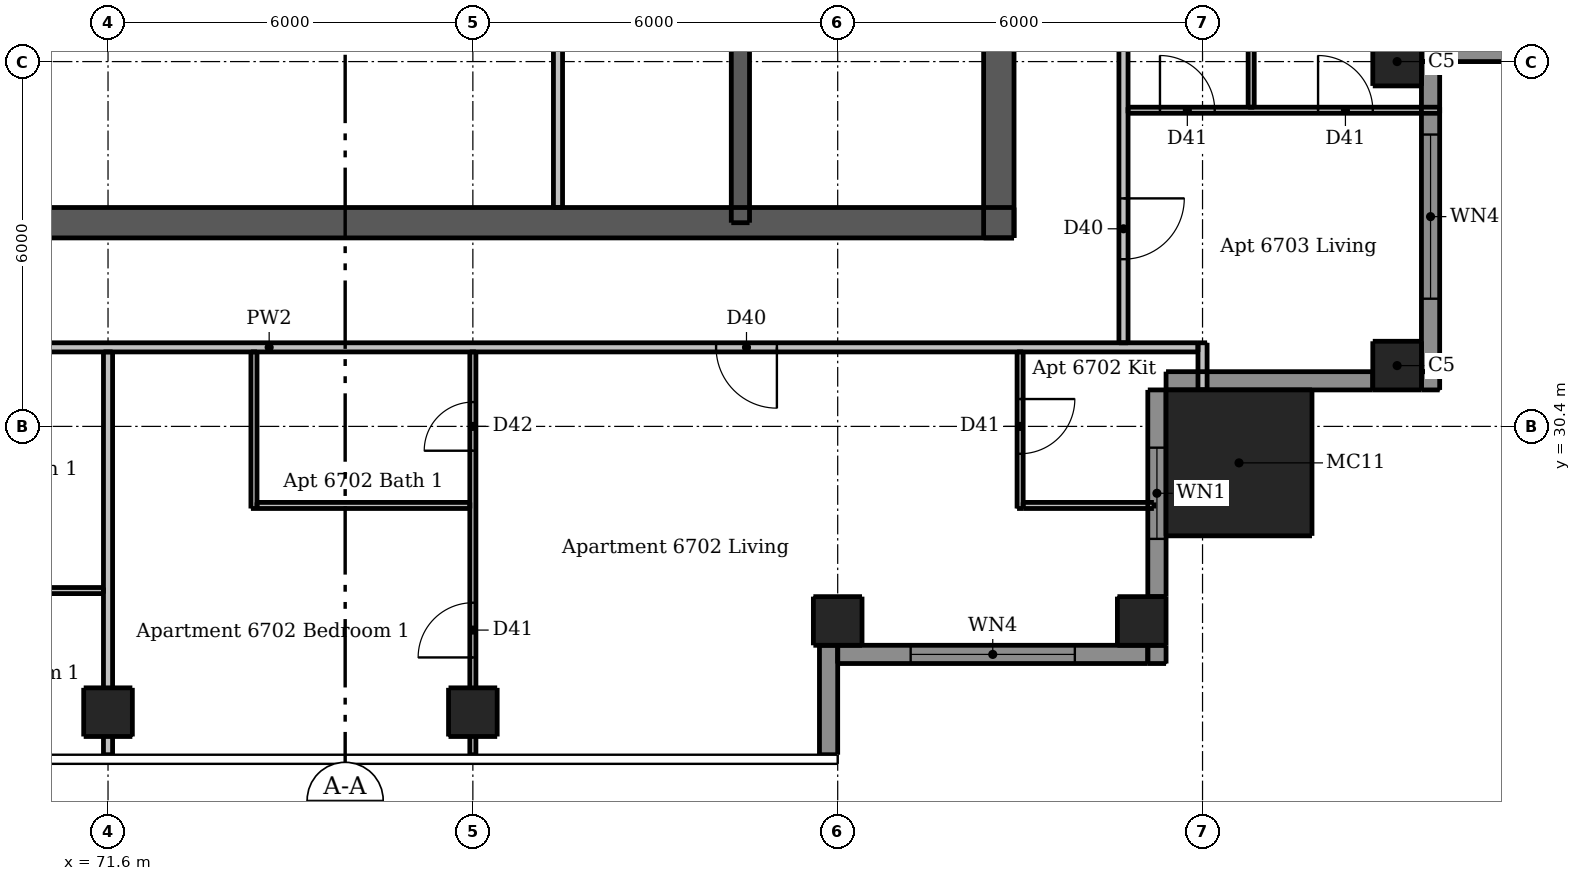
"""IFC4 building model, lengths in metres.
Left out: names, types, materials, properties, quantities, classifications, styles, units other than length and angle.
Written with IfcOpenShell. Run it as: python <this file> out.ifc"""

import sys

from ifc_helpers import new_model, si_unit, direction, frame, frame_2d, origin, origin_2d, place, context, subcontext, project, spatial, rectangle, extrude, element, fill, save


model = new_model("IFC4")
c1 = context("Model", 3, precision=1e-05, world=origin(), true_north=direction((0.0, 1.0)))
c2 = subcontext(c1, "Body", "Model", "MODEL_VIEW")
j1 = project(units=[si_unit("LENGTHUNIT", "METRE"), si_unit("PLANEANGLEUNIT", "RADIAN")], contexts=[c1])
p1 = place(None, origin())
s1 = spatial("IfcSite", under=j1, at=p1, CompositionType="ELEMENT")
p2 = place(p1, origin())
s2 = spatial("IfcBuilding", under=s1, at=p2, CompositionType="ELEMENT")
p3 = place(p2, frame((0.0, 0.0, 252.1)))
s3 = spatial("IfcBuildingStorey", under=s2, at=p3, CompositionType="ELEMENT", Elevation=252.1)
p4 = place(p3, frame((62.5, 33.75, 0.0), z_axis=(0.0, 0.0, 1.0), x_axis=(1.0, 0.0, 0.0)))
e1 = element("IfcWall", 1, at=p4, inside=s3, PredefinedType="SHEAR", context=c2, shape_type="SweptSolid", body=[
    extrude(rectangle(XDim=24.0, YDim=0.5, at=frame_2d((12.0, 0.0))), origin(), (0.0, 0.0, 1.0), 3.05),
])
p5 = place(p4, frame((1.875, 0.0, 0.0)))
e2 = element("IfcOpeningElement", 2, at=p5, cuts=e1, PredefinedType="OPENING", context=c2, shape_type="SweptSolid", body=[
    extrude(rectangle(XDim=1.1, YDim=2.1, at=frame_2d((0.55, 1.05))), frame((0.0, 0.26, 0.0), z_axis=(0.0, -1.0, 0.0), x_axis=(1.0, 0.0, 0.0)), (0.0, 0.0, 1.0), 0.52),
])
p6 = place(p4, frame((21.025, 0.0, 0.0)))
e3 = element("IfcOpeningElement", 3, at=p6, cuts=e1, PredefinedType="OPENING", context=c2, shape_type="SweptSolid", body=[
    extrude(rectangle(XDim=1.1, YDim=2.1, at=frame_2d((0.55, 1.05))), frame((0.0, 0.26, 0.0), z_axis=(0.0, -1.0, 0.0), x_axis=(1.0, 0.0, 0.0)), (0.0, 0.0, 1.0), 0.52),
])
p7 = place(p4, frame((8.0, 0.0, 0.0)))
e4 = element("IfcOpeningElement", 4, at=p7, cuts=e1, PredefinedType="OPENING", context=c2, shape_type="SweptSolid", body=[
    extrude(rectangle(XDim=1.1, YDim=2.1, at=frame_2d((0.55, 1.05))), frame((0.0, 0.26, 0.0), z_axis=(0.0, -1.0, 0.0), x_axis=(1.0, 0.0, 0.0)), (0.0, 0.0, 1.0), 0.52),
])
p8 = place(p4, frame((17.512, 0.0, 0.0)))
e5 = element("IfcOpeningElement", 5, at=p8, cuts=e1, PredefinedType="OPENING", context=c2, shape_type="SweptSolid", body=[
    extrude(rectangle(XDim=0.9, YDim=2.1, at=frame_2d((0.45, 1.05))), frame((0.0, 0.26, 0.0), z_axis=(0.0, -1.0, 0.0), x_axis=(1.0, 0.0, 0.0)), (0.0, 0.0, 1.0), 0.52),
])
p9 = place(p3, frame((86.25, 33.5, 0.0), z_axis=(0.0, 0.0, 1.0), x_axis=(0.0, 1.0, 0.0)))
e6 = element("IfcWall", 6, at=p9, inside=s3, PredefinedType="SHEAR", context=c2, shape_type="SweptSolid", body=[
    extrude(rectangle(XDim=24.0, YDim=0.5, at=frame_2d((12.0, 0.0))), origin(), (0.0, 0.0, 1.0), 3.05),
])
p10 = place(p9, frame((11.2, 0.0, 0.0)))
e7 = element("IfcOpeningElement", 7, at=p10, cuts=e6, PredefinedType="OPENING", context=c2, shape_type="SweptSolid", body=[
    extrude(rectangle(XDim=1.6, YDim=2.1, at=frame_2d((0.8, 1.05))), frame((0.0, 0.26, 0.0), z_axis=(0.0, -1.0, 0.0), x_axis=(1.0, 0.0, 0.0)), (0.0, 0.0, 1.0), 0.52),
])
p11 = place(p3, frame((82.0, 33.75, 0.0), z_axis=(0.0, 0.0, 1.0), x_axis=(0.0, 1.0, 0.0)))
e8 = element("IfcWall", 8, at=p11, inside=s3, PredefinedType="SHEAR", context=c2, shape_type="SweptSolid", body=[
    extrude(rectangle(XDim=10.15, YDim=0.3, at=frame_2d((5.075, 0.0))), origin(), (0.0, 0.0, 1.0), 3.05),
])
for number, where, z_axis, x_axis in (
    (9, (71.6, 25.7, 0.0), (0.0, 0.0, 1.0), (1.0, 0.0, 0.0)),
    (10, (77.6, 25.7, 0.0), (0.0, 0.0, 1.0), (1.0, 0.0, 0.0)),
    (11, (83.6, 27.2, 0.0), (0.0, 0.0, 1.0), (1.0, 0.0, 0.0)),
    (12, (88.6, 27.2, 0.0), (0.0, 0.0, 1.0), (1.0, 0.0, 0.0)),
    (13, (92.8, 31.4, 0.0), (0.0, 0.0, 1.0), (1.0, 0.0, 0.0)),
    (14, (92.8, 36.4, 0.0), (0.0, 0.0, 1.0), (1.0, 0.0, 0.0)),
):
    element("IfcColumn", number, at=place(p3, frame(where, z_axis=z_axis, x_axis=x_axis)), inside=s3, PredefinedType="COLUMN", context=c2, shape_type="SweptSolid", body=[
        extrude(rectangle(XDim=0.8, YDim=0.8, at=origin_2d()), origin(), (0.0, 0.0, 1.0), 3.05),
    ])
p12 = place(p3, frame((90.2, 29.8, 0.0), z_axis=(0.0, 0.0, 1.0), x_axis=(1.0, 0.0, 0.0)))
e15 = element("IfcColumn", 15, at=p12, inside=s3, PredefinedType="COLUMN", context=c2, shape_type="SweptSolid", body=[
    extrude(rectangle(XDim=2.4, YDim=2.4, at=origin_2d()), origin(), (0.0, 0.0, 1.0), 3.3),
])
p13 = place(p3, frame((83.45, 25.0, 0.0), z_axis=(0.0, 0.0, 1.0), x_axis=(0.0, 1.0, 0.0)))
e16 = element("IfcWall", 16, at=p13, inside=s3, PredefinedType="SOLIDWALL", context=c2, shape_type="SweptSolid", body=[
    extrude(rectangle(XDim=1.8, YDim=0.3, at=frame_2d((0.9, 0.0))), origin(), (0.0, 0.0, 1.0), 3.05),
])
p14 = place(p3, frame((88.85, 26.5, 0.0), z_axis=(0.0, 0.0, 1.0), x_axis=(0.0, 1.0, 0.0)))
e17 = element("IfcWall", 17, at=p14, inside=s3, PredefinedType="SOLIDWALL", context=c2, shape_type="SweptSolid", body=[
    extrude(rectangle(XDim=0.3, YDim=0.3, at=frame_2d((0.15, 0.0))), origin(), (0.0, 0.0, 1.0), 3.05),
])
p15 = place(p3, frame((88.85, 27.6, 0.0), z_axis=(0.0, 0.0, 1.0), x_axis=(0.0, 1.0, 0.0)))
e18 = element("IfcWall", 18, at=p15, inside=s3, PredefinedType="SOLIDWALL", context=c2, shape_type="SweptSolid", body=[
    extrude(rectangle(XDim=3.4, YDim=0.3, at=frame_2d((1.7, 0.0))), origin(), (0.0, 0.0, 1.0), 3.05),
])
p16 = place(p15, frame((0.95, 0.0, 0.9)))
e19 = element("IfcOpeningElement", 19, at=p16, cuts=e18, PredefinedType="OPENING", context=c2, shape_type="SweptSolid", body=[
    extrude(rectangle(XDim=1.5, YDim=1.5, at=frame_2d((0.75, 0.75))), frame((0.0, 0.16, 0.0), z_axis=(0.0, -1.0, 0.0), x_axis=(1.0, 0.0, 0.0)), (0.0, 0.0, 1.0), 0.32),
])
p17 = place(p3, frame((89.0, 31.15, 0.0), z_axis=(0.0, 0.0, 1.0), x_axis=(1.0, 0.0, 0.0)))
e20 = element("IfcWall", 20, at=p17, inside=s3, PredefinedType="SOLIDWALL", context=c2, shape_type="SweptSolid", body=[
    extrude(rectangle(XDim=3.4, YDim=0.3, at=frame_2d((1.7, 0.0))), origin(), (0.0, 0.0, 1.0), 3.05),
])
p18 = place(p3, frame((93.2, 31.15, 0.0), z_axis=(0.0, 0.0, 1.0), x_axis=(1.0, 0.0, 0.0)))
e21 = element("IfcWall", 21, at=p18, inside=s3, PredefinedType="SOLIDWALL", context=c2, shape_type="SweptSolid", body=[
    extrude(rectangle(XDim=0.3, YDim=0.3, at=frame_2d((0.15, 0.0))), origin(), (0.0, 0.0, 1.0), 3.05),
])
p19 = place(p3, frame((93.2, 36.55, 0.0), z_axis=(0.0, 0.0, 1.0), x_axis=(1.0, 0.0, 0.0)))
e22 = element("IfcWall", 22, at=p19, inside=s3, PredefinedType="SOLIDWALL", context=c2, shape_type="SweptSolid", body=[
    extrude(rectangle(XDim=1.8, YDim=0.3, at=frame_2d((0.9, 0.0))), origin(), (0.0, 0.0, 1.0), 3.05),
])
p20 = place(p3, frame((83.6, 26.65, 0.0), z_axis=(0.0, 0.0, 1.0), x_axis=(1.0, 0.0, 0.0)))
e23 = element("IfcWall", 23, at=p20, inside=s3, PredefinedType="SOLIDWALL", context=c2, shape_type="SweptSolid", body=[
    extrude(rectangle(XDim=5.1, YDim=0.3, at=frame_2d((2.55, 0.0))), origin(), (0.0, 0.0, 1.0), 3.05),
])
p21 = place(p20, frame((1.2, 0.0, 0.15)))
e24 = element("IfcOpeningElement", 24, at=p21, cuts=e23, PredefinedType="OPENING", context=c2, shape_type="SweptSolid", body=[
    extrude(rectangle(XDim=2.7, YDim=2.1, at=frame_2d((1.35, 1.05))), frame((0.0, 0.16, 0.0), z_axis=(0.0, -1.0, 0.0), x_axis=(1.0, 0.0, 0.0)), (0.0, 0.0, 1.0), 0.32),
])
p22 = place(p3, frame((93.35, 31.3, 0.0), z_axis=(0.0, 0.0, 1.0), x_axis=(0.0, 1.0, 0.0)))
e25 = element("IfcWall", 25, at=p22, inside=s3, PredefinedType="SOLIDWALL", context=c2, shape_type="SweptSolid", body=[
    extrude(rectangle(XDim=5.1, YDim=0.3, at=frame_2d((2.55, 0.0))), origin(), (0.0, 0.0, 1.0), 3.05),
])
p23 = place(p22, frame((1.2, 0.0, 0.15)))
e26 = element("IfcOpeningElement", 26, at=p23, cuts=e25, PredefinedType="OPENING", context=c2, shape_type="SweptSolid", body=[
    extrude(rectangle(XDim=2.7, YDim=2.1, at=frame_2d((1.35, 1.05))), frame((0.0, 0.16, 0.0), z_axis=(0.0, -1.0, 0.0), x_axis=(1.0, 0.0, 0.0)), (0.0, 0.0, 1.0), 0.32),
])
p24 = place(p3, frame((79.0, 34.0, 0.0), z_axis=(0.0, 0.0, 1.0), x_axis=(0.0, 1.0, 0.0)))
e27 = element("IfcWall", 27, at=p24, inside=s3, PredefinedType="PLUMBINGWALL", context=c2, shape_type="SweptSolid", body=[
    extrude(rectangle(XDim=6.85, YDim=0.15, at=frame_2d((3.425, 0.0))), origin(), (0.0, 0.0, 1.0), 3.05),
])
p25 = place(p3, frame((74.0, 29.05, 0.0), z_axis=(0.0, 0.0, 1.0), x_axis=(0.0, 1.0, 0.0)))
e28 = element("IfcWall", 28, at=p25, inside=s3, PredefinedType="PARTITIONING", context=c2, shape_type="SweptSolid", body=[
    extrude(rectangle(XDim=2.575, YDim=0.1, at=frame_2d((1.288, 0.0))), origin(), (0.0, 0.0, 1.0), 3.05),
])
p26 = place(p3, frame((77.6, 25.0, 0.0), z_axis=(0.0, 0.0, 1.0), x_axis=(0.0, 1.0, 0.0)))
e29 = element("IfcWall", 29, at=p26, inside=s3, PredefinedType="PARTITIONING", context=c2, shape_type="SweptSolid", body=[
    extrude(rectangle(XDim=6.625, YDim=0.1, at=frame_2d((3.312, 0.0))), origin(), (0.0, 0.0, 1.0), 2.59),
])
p27 = place(p26, frame((1.6, 0.0, 0.0)))
e30 = element("IfcOpeningElement", 30, at=p27, cuts=e29, PredefinedType="OPENING", context=c2, shape_type="SweptSolid", body=[
    extrude(rectangle(XDim=0.9, YDim=2.1, at=frame_2d((0.45, 1.05))), frame((0.0, 0.06, 0.0), z_axis=(0.0, -1.0, 0.0), x_axis=(1.0, 0.0, 0.0)), (0.0, 0.0, 1.0), 0.12),
])
p28 = place(p26, frame((5.0, 0.0, 0.0)))
e31 = element("IfcOpeningElement", 31, at=p28, cuts=e29, PredefinedType="OPENING", context=c2, shape_type="SweptSolid", body=[
    extrude(rectangle(XDim=0.8, YDim=2.1, at=frame_2d((0.4, 1.05))), frame((0.0, 0.06, 0.0), z_axis=(0.0, -1.0, 0.0), x_axis=(1.0, 0.0, 0.0)), (0.0, 0.0, 1.0), 0.12),
])
p29 = place(p3, frame((86.6, 31.625, 0.0), z_axis=(0.0, 0.0, 1.0), x_axis=(0.0, -1.0, 0.0)))
e32 = element("IfcWall", 32, at=p29, inside=s3, PredefinedType="PARTITIONING", context=c2, shape_type="SweptSolid", body=[
    extrude(rectangle(XDim=2.575, YDim=0.1, at=frame_2d((1.288, 0.0))), origin(), (0.0, 0.0, 1.0), 3.05),
])
p30 = place(p29, frame((0.775, 0.0, 0.0)))
e33 = element("IfcOpeningElement", 33, at=p30, cuts=e32, PredefinedType="OPENING", context=c2, shape_type="SweptSolid", body=[
    extrude(rectangle(XDim=0.9, YDim=2.1, at=frame_2d((0.45, 1.05))), frame((0.0, 0.06, 0.0), z_axis=(0.0, -1.0, 0.0), x_axis=(1.0, 0.0, 0.0)), (0.0, 0.0, 1.0), 0.12),
])
p31 = place(p3, frame((90.4, 35.65, 0.0), z_axis=(0.0, 0.0, 1.0), x_axis=(0.0, 1.0, 0.0)))
e34 = element("IfcWall", 34, at=p31, inside=s3, PredefinedType="PARTITIONING", context=c2, shape_type="SweptSolid", body=[
    extrude(rectangle(XDim=6.675, YDim=0.1, at=frame_2d((3.337, 0.0))), origin(), (0.0, 0.0, 1.0), 3.05),
])
p32 = place(p31, frame((4.15, 0.0, 0.0)))
e35 = element("IfcOpeningElement", 35, at=p32, cuts=e34, PredefinedType="OPENING", context=c2, shape_type="SweptSolid", body=[
    extrude(rectangle(XDim=0.8, YDim=2.1, at=frame_2d((0.4, 1.05))), frame((0.0, 0.06, 0.0), z_axis=(0.0, -1.0, 0.0), x_axis=(1.0, 0.0, 0.0)), (0.0, 0.0, 1.0), 0.12),
])
p33 = place(p3, frame((88.375, 35.6, 0.0), z_axis=(0.0, 0.0, 1.0), x_axis=(1.0, 0.0, 0.0)))
e36 = element("IfcWall", 36, at=p33, inside=s3, PredefinedType="PARTITIONING", context=c2, shape_type="SweptSolid", body=[
    extrude(rectangle(XDim=5.125, YDim=0.1, at=frame_2d((2.562, 0.0))), origin(), (0.0, 0.0, 1.0), 3.05),
])
p34 = place(p33, frame((0.525, 0.0, 0.0)))
e37 = element("IfcOpeningElement", 37, at=p34, cuts=e36, PredefinedType="OPENING", context=c2, shape_type="SweptSolid", body=[
    extrude(rectangle(XDim=0.9, YDim=2.1, at=frame_2d((0.45, 1.05))), frame((0.0, 0.06, 0.0), z_axis=(0.0, -1.0, 0.0), x_axis=(1.0, 0.0, 0.0)), (0.0, 0.0, 1.0), 0.12),
])
p35 = place(p33, frame((3.125, 0.0, 0.0)))
e38 = element("IfcOpeningElement", 38, at=p35, cuts=e36, PredefinedType="OPENING", context=c2, shape_type="SweptSolid", body=[
    extrude(rectangle(XDim=0.9, YDim=2.1, at=frame_2d((0.45, 1.05))), frame((0.0, 0.06, 0.0), z_axis=(0.0, -1.0, 0.0), x_axis=(1.0, 0.0, 0.0)), (0.0, 0.0, 1.0), 0.12),
])
p36 = place(p3, frame((74.05, 29.1, 0.0), z_axis=(0.0, 0.0, 1.0), x_axis=(1.0, 0.0, 0.0)))
e39 = element("IfcWall", 39, at=p36, inside=s3, PredefinedType="PARTITIONING", context=c2, shape_type="SweptSolid", body=[
    extrude(rectangle(XDim=3.5, YDim=0.1, at=frame_2d((1.75, 0.0))), origin(), (0.0, 0.0, 1.0), 3.05),
])
p37 = place(p3, frame((86.65, 29.1, 0.0), z_axis=(0.0, 0.0, 1.0), x_axis=(1.0, 0.0, 0.0)))
e40 = element("IfcWall", 40, at=p37, inside=s3, PredefinedType="PARTITIONING", context=c2, shape_type="SweptSolid", body=[
    extrude(rectangle(XDim=2.15, YDim=0.1, at=frame_2d((1.075, 0.0))), origin(), (0.0, 0.0, 1.0), 3.05),
])
p38 = place(p3, frame((65.65, 27.7, 0.0), z_axis=(0.0, 0.0, 1.0), x_axis=(1.0, 0.0, 0.0)))
e41 = element("IfcWall", 41, at=p38, inside=s3, PredefinedType="PARTITIONING", context=c2, shape_type="SweptSolid", body=[
    extrude(rectangle(XDim=5.875, YDim=0.1, at=frame_2d((2.938, 0.0))), origin(), (0.0, 0.0, 1.0), 3.05),
])
p39 = place(p38, frame((3.75, 0.0, 0.0)))
e42 = element("IfcOpeningElement", 42, at=p39, cuts=e41, PredefinedType="OPENING", context=c2, shape_type="SweptSolid", body=[
    extrude(rectangle(XDim=0.8, YDim=2.1, at=frame_2d((0.4, 1.05))), frame((0.0, 0.06, 0.0), z_axis=(0.0, -1.0, 0.0), x_axis=(1.0, 0.0, 0.0)), (0.0, 0.0, 1.0), 0.12),
])
p40 = place(p3, frame((71.6, 25.0, 0.0), z_axis=(0.0, 0.0, 1.0), x_axis=(0.0, 1.0, 0.0)))
e43 = element("IfcWall", 43, at=p40, inside=s3, PredefinedType="PARTITIONING", context=c2, shape_type="SweptSolid", body=[
    extrude(rectangle(XDim=6.625, YDim=0.15, at=frame_2d((3.312, 0.0))), origin(), (0.0, 0.0, 1.0), 2.59),
])
p41 = place(p3, frame((88.3, 61.175, 0.0), z_axis=(0.0, 0.0, 1.0), x_axis=(0.0, -1.0, 0.0)))
e44 = element("IfcWall", 44, at=p41, inside=s3, PredefinedType="PARTITIONING", context=c2, shape_type="SweptSolid", body=[
    extrude(rectangle(XDim=29.4, YDim=0.15, at=frame_2d((14.7, 0.0))), origin(), (0.0, 0.0, 1.0), 3.05),
])
p42 = place(p41, frame((27.025, 0.0, 0.0)))
e45 = element("IfcOpeningElement", 45, at=p42, cuts=e44, PredefinedType="OPENING", context=c2, shape_type="SweptSolid", body=[
    extrude(rectangle(XDim=1.0, YDim=2.1, at=frame_2d((0.5, 1.05))), frame((0.0, 0.085, 0.0), z_axis=(0.0, -1.0, 0.0), x_axis=(1.0, 0.0, 0.0)), (0.0, 0.0, 1.0), 0.17),
])
p43 = place(p41, frame((9.275, 0.0, 0.0)))
e46 = element("IfcOpeningElement", 46, at=p43, cuts=e44, PredefinedType="OPENING", context=c2, shape_type="SweptSolid", body=[
    extrude(rectangle(XDim=1.0, YDim=2.1, at=frame_2d((0.5, 1.05))), frame((0.0, 0.085, 0.0), z_axis=(0.0, -1.0, 0.0), x_axis=(1.0, 0.0, 0.0)), (0.0, 0.0, 1.0), 0.17),
])
p44 = place(p3, frame((89.6, 31.0, 0.0), z_axis=(0.0, 0.0, 1.0), x_axis=(0.0, 1.0, 0.0)))
e47 = element("IfcWall", 47, at=p44, inside=s3, PredefinedType="PARTITIONING", context=c2, shape_type="SweptSolid", body=[
    extrude(rectangle(XDim=0.775, YDim=0.15, at=frame_2d((0.387, 0.0))), origin(), (0.0, 0.0, 1.0), 3.05),
])
p45 = place(p3, frame((89.525, 31.7, 0.0), z_axis=(0.0, 0.0, 1.0), x_axis=(-1.0, 0.0, 0.0)))
e48 = element("IfcWall", 48, at=p45, inside=s3, PredefinedType="PARTITIONING", context=c2, shape_type="SweptSolid", body=[
    extrude(rectangle(XDim=30.55, YDim=0.15, at=frame_2d((15.275, 0.0))), origin(), (0.0, 0.0, 1.0), 3.05),
])
p46 = place(p45, frame((26.775, 0.0, 0.0)))
e49 = element("IfcOpeningElement", 49, at=p46, cuts=e48, PredefinedType="OPENING", context=c2, shape_type="SweptSolid", body=[
    extrude(rectangle(XDim=1.0, YDim=2.1, at=frame_2d((0.5, 1.05))), frame((0.0, 0.085, 0.0), z_axis=(0.0, -1.0, 0.0), x_axis=(1.0, 0.0, 0.0)), (0.0, 0.0, 1.0), 0.17),
])
p47 = place(p45, frame((6.925, 0.0, 0.0)))
e50 = element("IfcOpeningElement", 50, at=p47, cuts=e48, PredefinedType="OPENING", context=c2, shape_type="SweptSolid", body=[
    extrude(rectangle(XDim=1.0, YDim=2.1, at=frame_2d((0.5, 1.05))), frame((0.0, 0.085, 0.0), z_axis=(0.0, -1.0, 0.0), x_axis=(1.0, 0.0, 0.0)), (0.0, 0.0, 1.0), 0.17),
])
p48 = place(p16, origin())
e51 = element("IfcWindow", 51, at=p48, inside=s3, PartitioningType="DOUBLE_PANEL_VERTICAL", PredefinedType="WINDOW", context=c2, shape_type="SweptSolid", body=[
    extrude(rectangle(XDim=1.5, YDim=1.5, at=frame_2d((0.75, 0.75))), frame((0.0, 0.03, 0.0), z_axis=(0.0, -1.0, 0.0), x_axis=(1.0, 0.0, 0.0)), (0.0, 0.0, 1.0), 0.06),
])
fill(e19, e51)
p49 = place(p21, origin())
e52 = element("IfcWindow", 52, at=p49, inside=s3, PartitioningType="DOUBLE_PANEL_VERTICAL", PredefinedType="WINDOW", context=c2, shape_type="SweptSolid", body=[
    extrude(rectangle(XDim=2.7, YDim=2.1, at=frame_2d((1.35, 1.05))), frame((0.0, 0.03, 0.0), z_axis=(0.0, -1.0, 0.0), x_axis=(1.0, 0.0, 0.0)), (0.0, 0.0, 1.0), 0.06),
])
fill(e24, e52)
p50 = place(p23, origin())
e53 = element("IfcWindow", 53, at=p50, inside=s3, PartitioningType="DOUBLE_PANEL_VERTICAL", PredefinedType="WINDOW", context=c2, shape_type="SweptSolid", body=[
    extrude(rectangle(XDim=2.7, YDim=2.1, at=frame_2d((1.35, 1.05))), frame((0.0, 0.03, 0.0), z_axis=(0.0, -1.0, 0.0), x_axis=(1.0, 0.0, 0.0)), (0.0, 0.0, 1.0), 0.06),
])
fill(e26, e53)
p51 = place(p6, origin())
e54 = element("IfcDoor", 54, at=p51, inside=s3, OperationType="SINGLE_SWING_RIGHT", PredefinedType="DOOR", context=c2, shape_type="SweptSolid", body=[
    extrude(rectangle(XDim=1.1, YDim=2.1, at=frame_2d((0.55, 1.05))), frame((0.0, 0.237, 0.0), z_axis=(0.0, -1.0, 0.0), x_axis=(1.0, 0.0, 0.0)), (0.0, 0.0, 1.0), 0.05),
])
fill(e3, e54)
p52 = place(p7, origin())
e55 = element("IfcDoor", 55, at=p52, inside=s3, OperationType="SINGLE_SWING_LEFT", PredefinedType="DOOR", context=c2, shape_type="SweptSolid", body=[
    extrude(rectangle(XDim=1.1, YDim=2.1, at=frame_2d((0.55, 1.05))), frame((0.0, 0.237, 0.0), z_axis=(0.0, -1.0, 0.0), x_axis=(1.0, 0.0, 0.0)), (0.0, 0.0, 1.0), 0.05),
])
fill(e4, e55)
p53 = place(p8, origin())
e56 = element("IfcDoor", 56, at=p53, inside=s3, OperationType="SINGLE_SWING_LEFT", PredefinedType="DOOR", context=c2, shape_type="SweptSolid", body=[
    extrude(rectangle(XDim=0.9, YDim=2.1, at=frame_2d((0.45, 1.05))), frame((0.0, 0.237, 0.0), z_axis=(0.0, -1.0, 0.0), x_axis=(1.0, 0.0, 0.0)), (0.0, 0.0, 1.0), 0.05),
])
fill(e5, e56)
p54 = place(p47, origin())
e57 = element("IfcDoor", 57, at=p54, inside=s3, OperationType="SINGLE_SWING_LEFT", PredefinedType="DOOR", context=c2, shape_type="SweptSolid", body=[
    extrude(rectangle(XDim=1.0, YDim=2.1, at=frame_2d((0.5, 1.05))), frame((0.0, 0.025, 0.0), z_axis=(0.0, -1.0, 0.0), x_axis=(1.0, 0.0, 0.0)), (0.0, 0.0, 1.0), 0.05),
])
fill(e50, e57)
p55 = place(p30, origin())
e58 = element("IfcDoor", 58, at=p55, inside=s3, OperationType="SINGLE_SWING_LEFT", PredefinedType="DOOR", context=c2, shape_type="SweptSolid", body=[
    extrude(rectangle(XDim=0.9, YDim=2.1, at=frame_2d((0.45, 1.05))), frame((0.0, 0.025, 0.0), z_axis=(0.0, -1.0, 0.0), x_axis=(1.0, 0.0, 0.0)), (0.0, 0.0, 1.0), 0.05),
])
fill(e33, e58)
p56 = place(p27, origin())
e59 = element("IfcDoor", 59, at=p56, inside=s3, OperationType="SINGLE_SWING_LEFT", PredefinedType="DOOR", context=c2, shape_type="SweptSolid", body=[
    extrude(rectangle(XDim=0.9, YDim=2.1, at=frame_2d((0.45, 1.05))), frame((0.0, 0.025, 0.0), z_axis=(0.0, -1.0, 0.0), x_axis=(1.0, 0.0, 0.0)), (0.0, 0.0, 1.0), 0.05),
])
fill(e30, e59)
p57 = place(p28, origin())
e60 = element("IfcDoor", 60, at=p57, inside=s3, OperationType="SINGLE_SWING_LEFT", PredefinedType="DOOR", context=c2, shape_type="SweptSolid", body=[
    extrude(rectangle(XDim=0.8, YDim=2.1, at=frame_2d((0.4, 1.05))), frame((0.0, 0.025, 0.0), z_axis=(0.0, -1.0, 0.0), x_axis=(1.0, 0.0, 0.0)), (0.0, 0.0, 1.0), 0.05),
])
fill(e31, e60)
p58 = place(p42, origin())
e61 = element("IfcDoor", 61, at=p58, inside=s3, OperationType="SINGLE_SWING_LEFT", PredefinedType="DOOR", context=c2, shape_type="SweptSolid", body=[
    extrude(rectangle(XDim=1.0, YDim=2.1, at=frame_2d((0.5, 1.05))), frame((0.0, 0.025, 0.0), z_axis=(0.0, -1.0, 0.0), x_axis=(1.0, 0.0, 0.0)), (0.0, 0.0, 1.0), 0.05),
])
fill(e45, e61)
p59 = place(p34, origin())
e62 = element("IfcDoor", 62, at=p59, inside=s3, OperationType="SINGLE_SWING_LEFT", PredefinedType="DOOR", context=c2, shape_type="SweptSolid", body=[
    extrude(rectangle(XDim=0.9, YDim=2.1, at=frame_2d((0.45, 1.05))), frame((0.0, 0.025, 0.0), z_axis=(0.0, -1.0, 0.0), x_axis=(1.0, 0.0, 0.0)), (0.0, 0.0, 1.0), 0.05),
])
fill(e37, e62)
p60 = place(p35, origin())
e63 = element("IfcDoor", 63, at=p60, inside=s3, OperationType="SINGLE_SWING_LEFT", PredefinedType="DOOR", context=c2, shape_type="SweptSolid", body=[
    extrude(rectangle(XDim=0.9, YDim=2.1, at=frame_2d((0.45, 1.05))), frame((0.0, 0.025, 0.0), z_axis=(0.0, -1.0, 0.0), x_axis=(1.0, 0.0, 0.0)), (0.0, 0.0, 1.0), 0.05),
])
fill(e38, e63)
save(model, sys.argv[1])
